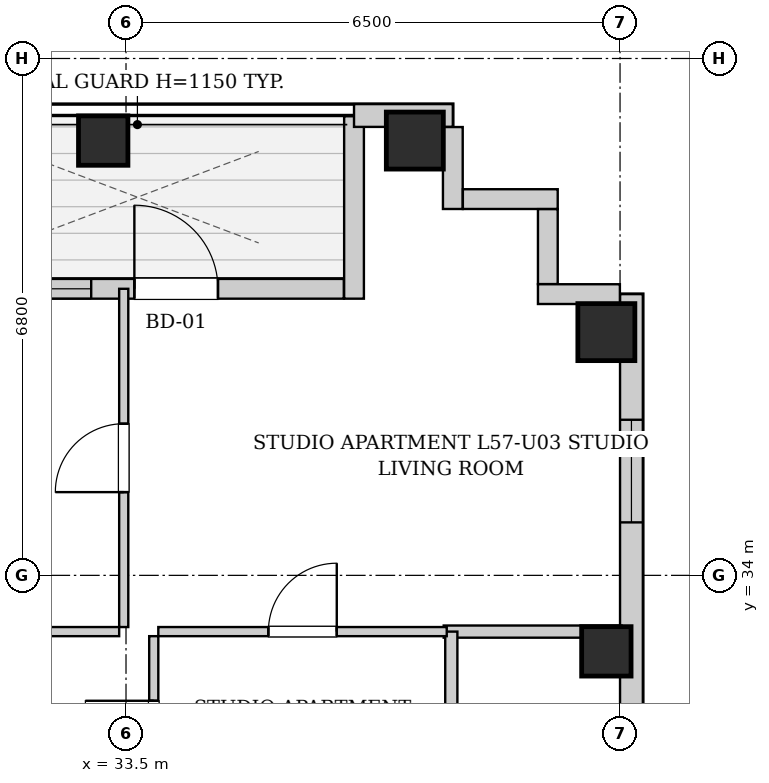
"""IFC4 building model, lengths in metres.
Left out: names, types, materials, properties, quantities, classifications, styles, units other than length and angle.
Written with IfcOpenShell. Run it as: python <this file> out.ifc"""

import sys

from ifc_helpers import new_model, si_unit, direction, frame, frame_2d, origin, origin_2d, place, context, subcontext, project, spatial, rectangle, extrude, element, fill, save


model = new_model("IFC4")
c1 = context("Model", 3, precision=1e-05, world=origin(), true_north=direction((0.0, 1.0)))
c2 = subcontext(c1, "Body", "Model", "MODEL_VIEW")
j1 = project(units=[si_unit("LENGTHUNIT", "METRE"), si_unit("PLANEANGLEUNIT", "RADIAN")], contexts=[c1])
p1 = place(None, origin())
s1 = spatial("IfcSite", under=j1, at=p1, CompositionType="ELEMENT")
p2 = place(p1, origin())
s2 = spatial("IfcBuilding", under=s1, at=p2, CompositionType="ELEMENT")
p3 = place(p2, frame((0.0, 0.0, 197.5)))
s3 = spatial("IfcBuildingStorey", under=s2, at=p3, CompositionType="ELEMENT", Elevation=197.5)
p4 = place(p3, frame((33.2, 39.72, 0.0), z_axis=(0.0, 0.0, 1.0), x_axis=(1.0, 0.0, 0.0)))
e1 = element("IfcColumn", 1, at=p4, inside=s3, PredefinedType="COLUMN", context=c2, shape_type="SweptSolid", body=[
    extrude(rectangle(XDim=0.65, YDim=0.65, at=origin_2d()), origin(), (0.0, 0.0, 1.0), 3.3),
])
p5 = place(p3, frame((37.3, 39.72, 0.0), z_axis=(0.0, 0.0, 1.0), x_axis=(1.0, 0.0, 0.0)))
e2 = element("IfcColumn", 2, at=p5, inside=s3, PredefinedType="COLUMN", context=c2, shape_type="SweptSolid", body=[
    extrude(rectangle(XDim=0.75, YDim=0.75, at=origin_2d()), origin(), (0.0, 0.0, 1.0), 3.3),
])
p6 = place(p3, frame((39.82, 33.0, 0.0), z_axis=(0.0, 0.0, 1.0), x_axis=(1.0, 0.0, 0.0)))
e3 = element("IfcColumn", 3, at=p6, inside=s3, PredefinedType="COLUMN", context=c2, shape_type="SweptSolid", body=[
    extrude(rectangle(XDim=0.65, YDim=0.65, at=origin_2d()), origin(), (0.0, 0.0, 1.0), 3.3),
])
p7 = place(p3, frame((39.82, 37.2, 0.0), z_axis=(0.0, 0.0, 1.0), x_axis=(1.0, 0.0, 0.0)))
e4 = element("IfcColumn", 4, at=p7, inside=s3, PredefinedType="COLUMN", context=c2, shape_type="SweptSolid", body=[
    extrude(rectangle(XDim=0.75, YDim=0.75, at=origin_2d()), origin(), (0.0, 0.0, 1.0), 3.3),
])
p8 = place(p3, frame((30.934, 37.77, 0.0), z_axis=(0.0, 0.0, 1.0), x_axis=(1.0, 0.0, 0.0)))
e5 = element("IfcWall", 5, at=p8, inside=s3, PredefinedType="SOLIDWALL", context=c2, shape_type="SweptSolid", body=[
    extrude(rectangle(XDim=5.432, YDim=0.26, at=frame_2d((2.716, 0.0))), origin(), (0.0, 0.0, 1.0), 3.04),
])
p9 = place(p8, frame((2.676, 0.0, 0.0)))
e6 = element("IfcOpeningElement", 6, at=p9, cuts=e5, PredefinedType="OPENING", context=c2, shape_type="SweptSolid", body=[
    extrude(rectangle(XDim=1.1, YDim=2.0, at=frame_2d((0.55, 1.0))), frame((0.0, 0.14, 0.0), z_axis=(0.0, -1.0, 0.0), x_axis=(1.0, 0.0, 0.0)), (0.0, 0.0, 1.0), 0.28),
])
p10 = place(p8, frame((0.758, 0.0, 0.55)))
e7 = element("IfcOpeningElement", 7, at=p10, cuts=e5, PredefinedType="OPENING", context=c2, shape_type="SweptSolid", body=[
    extrude(rectangle(XDim=1.35, YDim=1.2, at=frame_2d((0.675, 0.6))), frame((0.0, 0.14, 0.0), z_axis=(0.0, -1.0, 0.0), x_axis=(1.0, 0.0, 0.0)), (0.0, 0.0, 1.0), 0.28),
])
p11 = place(p3, frame((36.5, 37.64, 0.0), z_axis=(0.0, 0.0, 1.0), x_axis=(0.0, 1.0, 0.0)))
e8 = element("IfcWall", 8, at=p11, inside=s3, PredefinedType="SOLIDWALL", context=c2, shape_type="SweptSolid", body=[
    extrude(rectangle(XDim=2.4, YDim=0.26, at=frame_2d((1.2, 0.0))), origin(), (0.0, 0.0, 1.0), 3.04),
])
p12 = place(p3, frame((36.5, 40.05, 0.0), z_axis=(0.0, 0.0, 1.0), x_axis=(1.0, 0.0, 0.0)))
e9 = element("IfcWall", 9, at=p12, inside=s3, PredefinedType="SOLIDWALL", context=c2, shape_type="SweptSolid", body=[
    extrude(rectangle(XDim=1.3, YDim=0.3, at=frame_2d((0.65, 0.0))), origin(), (0.0, 0.0, 1.0), 3.04),
])
p13 = place(p3, frame((40.15, 37.7, 0.0), z_axis=(0.0, 0.0, 1.0), x_axis=(0.0, -1.0, 0.0)))
e10 = element("IfcWall", 10, at=p13, inside=s3, PredefinedType="SOLIDWALL", context=c2, shape_type="SweptSolid", body=[
    extrude(rectangle(XDim=31.4, YDim=0.3, at=frame_2d((15.7, 0.0))), origin(), (0.0, 0.0, 1.0), 3.04),
])
p14 = place(p13, frame((28.396, 0.0, 0.55)))
e11 = element("IfcOpeningElement", 11, at=p14, cuts=e10, PredefinedType="OPENING", context=c2, shape_type="SweptSolid", body=[
    extrude(rectangle(XDim=1.35, YDim=1.2, at=frame_2d((0.675, 0.6))), frame((0.0, 0.16, 0.0), z_axis=(0.0, -1.0, 0.0), x_axis=(1.0, 0.0, 0.0)), (0.0, 0.0, 1.0), 0.32),
])
p15 = place(p13, frame((1.653, 0.0, 0.55)))
e12 = element("IfcOpeningElement", 12, at=p15, cuts=e10, PredefinedType="OPENING", context=c2, shape_type="SweptSolid", body=[
    extrude(rectangle(XDim=1.35, YDim=1.2, at=frame_2d((0.675, 0.6))), frame((0.0, 0.16, 0.0), z_axis=(0.0, -1.0, 0.0), x_axis=(1.0, 0.0, 0.0)), (0.0, 0.0, 1.0), 0.32),
])
p16 = place(p13, frame((19.683, 0.0, 0.55)))
e13 = element("IfcOpeningElement", 13, at=p16, cuts=e10, PredefinedType="OPENING", context=c2, shape_type="SweptSolid", body=[
    extrude(rectangle(XDim=1.35, YDim=1.2, at=frame_2d((0.675, 0.6))), frame((0.0, 0.16, 0.0), z_axis=(0.0, -1.0, 0.0), x_axis=(1.0, 0.0, 0.0)), (0.0, 0.0, 1.0), 0.32),
])
p17 = place(p13, frame((10.367, 0.0, 0.55)))
e14 = element("IfcOpeningElement", 14, at=p17, cuts=e10, PredefinedType="OPENING", context=c2, shape_type="SweptSolid", body=[
    extrude(rectangle(XDim=1.35, YDim=1.2, at=frame_2d((0.675, 0.6))), frame((0.0, 0.16, 0.0), z_axis=(0.0, -1.0, 0.0), x_axis=(1.0, 0.0, 0.0)), (0.0, 0.0, 1.0), 0.32),
])
p18 = place(p3, frame((37.8, 39.898, 0.0), z_axis=(0.0, 0.0, 1.0), x_axis=(0.0, -1.0, 0.0)))
e15 = element("IfcWall", 15, at=p18, inside=s3, PredefinedType="SOLIDWALL", context=c2, shape_type="SweptSolid", body=[
    extrude(rectangle(XDim=1.078, YDim=0.26, at=frame_2d((0.539, 0.0))), origin(), (0.0, 0.0, 1.0), 3.04),
])
p19 = place(p3, frame((37.932, 38.95, 0.0), z_axis=(0.0, 0.0, 1.0), x_axis=(1.0, 0.0, 0.0)))
e16 = element("IfcWall", 16, at=p19, inside=s3, PredefinedType="SOLIDWALL", context=c2, shape_type="SweptSolid", body=[
    extrude(rectangle(XDim=1.248, YDim=0.26, at=frame_2d((0.624, 0.0))), origin(), (0.0, 0.0, 1.0), 3.04),
])
p20 = place(p3, frame((39.05, 38.818, 0.0), z_axis=(0.0, 0.0, 1.0), x_axis=(0.0, -1.0, 0.0)))
e17 = element("IfcWall", 17, at=p20, inside=s3, PredefinedType="SOLIDWALL", context=c2, shape_type="SweptSolid", body=[
    extrude(rectangle(XDim=0.986, YDim=0.26, at=frame_2d((0.493, 0.0))), origin(), (0.0, 0.0, 1.0), 3.04),
])
p21 = place(p3, frame((38.92, 37.7, 0.0), z_axis=(0.0, 0.0, 1.0), x_axis=(1.0, 0.0, 0.0)))
e18 = element("IfcWall", 18, at=p21, inside=s3, PredefinedType="SOLIDWALL", context=c2, shape_type="SweptSolid", body=[
    extrude(rectangle(XDim=1.078, YDim=0.26, at=frame_2d((0.539, 0.0))), origin(), (0.0, 0.0, 1.0), 3.04),
])
p22 = place(p3, frame((37.68, 33.26, 0.0), z_axis=(0.0, 0.0, 1.0), x_axis=(1.0, 0.0, 0.0)))
e19 = element("IfcWall", 19, at=p22, inside=s3, PredefinedType="PARTITIONING", context=c2, shape_type="SweptSolid", body=[
    extrude(rectangle(XDim=2.34, YDim=0.16, at=frame_2d((1.17, 0.0))), origin(), (0.0, 0.0, 1.0), 3.04),
])
p23 = place(p3, frame((37.78, 30.6, 0.0), z_axis=(0.0, 0.0, 1.0), x_axis=(0.0, 1.0, 0.0)))
e20 = element("IfcWall", 20, at=p23, inside=s3, PredefinedType="PARTITIONING", context=c2, shape_type="SweptSolid", body=[
    extrude(rectangle(XDim=2.66, YDim=0.16, at=frame_2d((1.33, 0.0))), origin(), (0.0, 0.0, 1.0), 3.04),
])
p24 = place(p3, frame((33.865, 30.6, 0.0), z_axis=(0.0, 0.0, 1.0), x_axis=(0.0, 1.0, 0.0)))
e21 = element("IfcWall", 21, at=p24, inside=s3, PredefinedType="PARTITIONING", context=c2, shape_type="SweptSolid", body=[
    extrude(rectangle(XDim=2.6, YDim=0.12, at=frame_2d((1.3, 0.0))), origin(), (0.0, 0.0, 1.0), 3.04),
])
p25 = place(p24, frame((0.85, 0.0, 0.0)))
e22 = element("IfcOpeningElement", 22, at=p25, cuts=e21, PredefinedType="OPENING", context=c2, shape_type="SweptSolid", body=[
    extrude(rectangle(XDim=0.9, YDim=2.05, at=frame_2d((0.45, 1.025))), frame((0.0, 0.07, 0.0), z_axis=(0.0, -1.0, 0.0), x_axis=(1.0, 0.0, 0.0)), (0.0, 0.0, 1.0), 0.14),
])
p26 = place(p3, frame((30.31, 33.26, 0.0), z_axis=(0.0, 0.0, 1.0), x_axis=(1.0, 0.0, 0.0)))
e23 = element("IfcWall", 23, at=p26, inside=s3, PredefinedType="PARTITIONING", context=c2, shape_type="SweptSolid", body=[
    extrude(rectangle(XDim=3.1, YDim=0.12, at=frame_2d((1.55, 0.0))), origin(), (0.0, 0.0, 1.0), 3.04),
])
p27 = place(p26, frame((1.1, 0.0, 0.0)))
e24 = element("IfcOpeningElement", 24, at=p27, cuts=e23, PredefinedType="OPENING", context=c2, shape_type="SweptSolid", body=[
    extrude(rectangle(XDim=0.9, YDim=2.05, at=frame_2d((0.45, 1.025))), frame((0.0, 0.07, 0.0), z_axis=(0.0, -1.0, 0.0), x_axis=(1.0, 0.0, 0.0)), (0.0, 0.0, 1.0), 0.14),
])
p28 = place(p3, frame((33.925, 33.26, 0.0), z_axis=(0.0, 0.0, 1.0), x_axis=(1.0, 0.0, 0.0)))
e25 = element("IfcWall", 25, at=p28, inside=s3, PredefinedType="PARTITIONING", context=c2, shape_type="SweptSolid", body=[
    extrude(rectangle(XDim=3.795, YDim=0.12, at=frame_2d((1.897, 0.0))), origin(), (0.0, 0.0, 1.0), 3.04),
])
p29 = place(p28, frame((1.448, 0.0, 0.0)))
e26 = element("IfcOpeningElement", 26, at=p29, cuts=e25, PredefinedType="OPENING", context=c2, shape_type="SweptSolid", body=[
    extrude(rectangle(XDim=0.9, YDim=2.05, at=frame_2d((0.45, 1.025))), frame((0.0, 0.07, 0.0), z_axis=(0.0, -1.0, 0.0), x_axis=(1.0, 0.0, 0.0)), (0.0, 0.0, 1.0), 0.14),
])
p30 = place(p3, frame((33.47, 33.32, 0.0), z_axis=(0.0, 0.0, 1.0), x_axis=(0.0, 1.0, 0.0)))
e27 = element("IfcWall", 27, at=p30, inside=s3, PredefinedType="PARTITIONING", context=c2, shape_type="SweptSolid", body=[
    extrude(rectangle(XDim=4.45, YDim=0.12, at=frame_2d((2.225, 0.0))), origin(), (0.0, 0.0, 1.0), 3.04),
])
p31 = place(p30, frame((1.775, 0.0, 0.0)))
e28 = element("IfcOpeningElement", 28, at=p31, cuts=e27, PredefinedType="OPENING", context=c2, shape_type="SweptSolid", body=[
    extrude(rectangle(XDim=0.9, YDim=2.05, at=frame_2d((0.45, 1.025))), frame((0.0, 0.07, 0.0), z_axis=(0.0, -1.0, 0.0), x_axis=(1.0, 0.0, 0.0)), (0.0, 0.0, 1.0), 0.14),
])
p32 = place(p25, origin())
e29 = element("IfcDoor", 29, at=p32, inside=s3, OperationType="SINGLE_SWING_RIGHT", PredefinedType="DOOR", context=c2, shape_type="SweptSolid", body=[
    extrude(rectangle(XDim=0.9, YDim=2.05, at=frame_2d((0.45, 1.025))), frame((0.0, 0.025, 0.0), z_axis=(0.0, -1.0, 0.0), x_axis=(1.0, 0.0, 0.0)), (0.0, 0.0, 1.0), 0.05),
])
fill(e22, e29)
p33 = place(p29, origin())
e30 = element("IfcDoor", 30, at=p33, inside=s3, OperationType="SINGLE_SWING_RIGHT", PredefinedType="DOOR", context=c2, shape_type="SweptSolid", body=[
    extrude(rectangle(XDim=0.9, YDim=2.05, at=frame_2d((0.45, 1.025))), frame((0.0, 0.025, 0.0), z_axis=(0.0, -1.0, 0.0), x_axis=(1.0, 0.0, 0.0)), (0.0, 0.0, 1.0), 0.05),
])
fill(e26, e30)
p34 = place(p31, origin())
e31 = element("IfcDoor", 31, at=p34, inside=s3, OperationType="SINGLE_SWING_LEFT", PredefinedType="DOOR", context=c2, shape_type="SweptSolid", body=[
    extrude(rectangle(XDim=0.9, YDim=2.05, at=frame_2d((0.45, 1.025))), frame((0.0, 0.025, 0.0), z_axis=(0.0, -1.0, 0.0), x_axis=(1.0, 0.0, 0.0)), (0.0, 0.0, 1.0), 0.05),
])
fill(e28, e31)
p35 = place(p9, origin())
e32 = element("IfcDoor", 32, at=p35, inside=s3, OperationType="SINGLE_SWING_LEFT", PredefinedType="DOOR", context=c2, shape_type="SweptSolid", body=[
    extrude(rectangle(XDim=1.1, YDim=2.0, at=frame_2d((0.55, 1.0))), frame((0.0, 0.025, 0.0), z_axis=(0.0, -1.0, 0.0), x_axis=(1.0, 0.0, 0.0)), (0.0, 0.0, 1.0), 0.05),
])
fill(e6, e32)
p36 = place(p10, origin())
e33 = element("IfcWindow", 33, at=p36, inside=s3, PartitioningType="SINGLE_PANEL", PredefinedType="WINDOW", context=c2, shape_type="SweptSolid", body=[
    extrude(rectangle(XDim=1.35, YDim=1.2, at=frame_2d((0.675, 0.6))), frame((0.0, 0.03, 0.0), z_axis=(0.0, -1.0, 0.0), x_axis=(1.0, 0.0, 0.0)), (0.0, 0.0, 1.0), 0.06),
])
fill(e7, e33)
p37 = place(p15, origin())
e34 = element("IfcWindow", 34, at=p37, inside=s3, PartitioningType="SINGLE_PANEL", PredefinedType="WINDOW", context=c2, shape_type="SweptSolid", body=[
    extrude(rectangle(XDim=1.35, YDim=1.2, at=frame_2d((0.675, 0.6))), frame((0.0, 0.03, 0.0), z_axis=(0.0, -1.0, 0.0), x_axis=(1.0, 0.0, 0.0)), (0.0, 0.0, 1.0), 0.06),
])
fill(e12, e34)
save(model, sys.argv[1])
